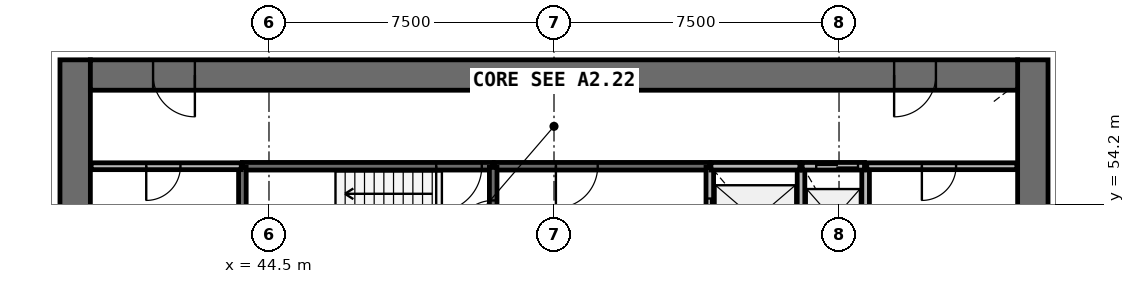
"""IFC4 building model, lengths in metres.
Left out: names, types, materials, properties, quantities, classifications, styles, units other than length and angle.
Written with IfcOpenShell. Run it as: python <this file> out.ifc"""

import sys

from ifc_helpers import new_model, si_unit, direction, frame, frame_2d, origin, place, context, subcontext, project, spatial, rectangle, extrude, source, transform, mapped, element, fill, save


model = new_model("IFC4")
c1 = context("Model", 3, precision=1e-05, world=origin(), true_north=direction((0.0, 1.0)))
c2 = subcontext(c1, "Body", "Model", "MODEL_VIEW")
j1 = project(units=[si_unit("LENGTHUNIT", "METRE"), si_unit("PLANEANGLEUNIT", "RADIAN")], contexts=[c1])
p1 = place(None, origin())
s1 = spatial("IfcSite", under=j1, at=p1, CompositionType="ELEMENT")
p2 = place(p1, origin())
s2 = spatial("IfcBuilding", under=s1, at=p2, CompositionType="ELEMENT")
p3 = place(p2, frame((0.0, 0.0, 92.1)))
s3 = spatial("IfcBuildingStorey", under=s2, at=p3, CompositionType="ELEMENT", Elevation=92.1)
p4 = place(p3, frame((64.6, 38.0, 0.0), z_axis=(0.0, 0.0, 1.0), x_axis=(0.0, 1.0, 0.0)))
e1 = element("IfcWall", 1, at=p4, inside=s3, PredefinedType="SHEAR", context=c2, shape_type="SweptSolid", body=[
    extrude(rectangle(XDim=20.0, YDim=0.8, at=frame_2d((10.0, 0.0))), origin(), (0.0, 0.0, 1.0), 4.1),
])
p5 = place(p4, frame((9.1, 0.0, 0.0)))
e2 = element("IfcOpeningElement", 2, at=p5, cuts=e1, PredefinedType="OPENING", context=c2, shape_type="SweptSolid", body=[
    extrude(rectangle(XDim=1.8, YDim=2.1, at=frame_2d((0.9, 1.05))), frame((0.0, 0.41, 0.0), z_axis=(0.0, -1.0, 0.0), x_axis=(1.0, 0.0, 0.0)), (0.0, 0.0, 1.0), 0.82),
])
p6 = place(p3, frame((39.4, 58.0, 0.0), z_axis=(0.0, 0.0, 1.0), x_axis=(0.0, -1.0, 0.0)))
e3 = element("IfcWall", 3, at=p6, inside=s3, PredefinedType="SHEAR", context=c2, shape_type="SweptSolid", body=[
    extrude(rectangle(XDim=20.0, YDim=0.8, at=frame_2d((10.0, 0.0))), origin(), (0.0, 0.0, 1.0), 4.1),
])
p7 = place(p6, frame((9.1, 0.0, 0.0)))
e4 = element("IfcOpeningElement", 4, at=p7, cuts=e3, PredefinedType="OPENING", context=c2, shape_type="SweptSolid", body=[
    extrude(rectangle(XDim=1.8, YDim=2.1, at=frame_2d((0.9, 1.05))), frame((0.0, 0.41, 0.0), z_axis=(0.0, -1.0, 0.0), x_axis=(1.0, 0.0, 0.0)), (0.0, 0.0, 1.0), 0.82),
])
p8 = place(p3, frame((64.2, 57.6, 0.0), z_axis=(0.0, 0.0, 1.0), x_axis=(-1.0, 0.0, 0.0)))
e5 = element("IfcWall", 5, at=p8, inside=s3, PredefinedType="SHEAR", context=c2, shape_type="SweptSolid", body=[
    extrude(rectangle(XDim=24.4, YDim=0.8, at=frame_2d((12.2, 0.0))), origin(), (0.0, 0.0, 1.0), 4.1),
])
p9 = place(p8, frame((21.65, 0.0, 0.0)))
e6 = element("IfcOpeningElement", 6, at=p9, cuts=e5, PredefinedType="OPENING", context=c2, shape_type="SweptSolid", body=[
    extrude(rectangle(XDim=1.1, YDim=2.1, at=frame_2d((0.55, 1.05))), frame((0.0, 0.41, 0.0), z_axis=(0.0, -1.0, 0.0), x_axis=(1.0, 0.0, 0.0)), (0.0, 0.0, 1.0), 0.82),
])
p10 = place(p8, frame((2.15, 0.0, 0.0)))
e7 = element("IfcOpeningElement", 7, at=p10, cuts=e5, PredefinedType="OPENING", context=c2, shape_type="SweptSolid", body=[
    extrude(rectangle(XDim=1.1, YDim=2.1, at=frame_2d((0.55, 1.05))), frame((0.0, 0.41, 0.0), z_axis=(0.0, -1.0, 0.0), x_axis=(1.0, 0.0, 0.0)), (0.0, 0.0, 1.0), 0.82),
])
p11 = place(p3, frame((50.4, 55.2, 0.0), z_axis=(0.0, 0.0, 1.0), x_axis=(-1.0, 0.0, 0.0)))
e8 = element("IfcWall", 8, at=p11, inside=s3, PredefinedType="SOLIDWALL", context=c2, shape_type="SweptSolid", body=[
    extrude(rectangle(XDim=6.6, YDim=0.2, at=frame_2d((3.3, 0.0))), origin(), (0.0, 0.0, 1.0), 3.7),
])
p12 = place(p11, frame((0.3, 0.0, 0.0)))
e9 = element("IfcOpeningElement", 9, at=p12, cuts=e8, PredefinedType="OPENING", context=c2, shape_type="SweptSolid", body=[
    extrude(rectangle(XDim=1.2, YDim=2.1, at=frame_2d((0.6, 1.05))), frame((0.0, 0.11, 0.0), z_axis=(0.0, -1.0, 0.0), x_axis=(1.0, 0.0, 0.0)), (0.0, 0.0, 1.0), 0.22),
])
p13 = place(p3, frame((56.1, 55.2, 0.0), z_axis=(0.0, 0.0, 1.0), x_axis=(-1.0, 0.0, 0.0)))
e10 = element("IfcWall", 10, at=p13, inside=s3, PredefinedType="SOLIDWALL", context=c2, shape_type="SweptSolid", body=[
    extrude(rectangle(XDim=5.67, YDim=0.2, at=frame_2d((2.835, 0.0))), origin(), (0.0, 0.0, 1.0), 3.7),
])
p14 = place(p13, frame((2.95, 0.0, 0.0)))
e11 = element("IfcOpeningElement", 11, at=p14, cuts=e10, PredefinedType="OPENING", context=c2, shape_type="SweptSolid", body=[
    extrude(rectangle(XDim=1.1, YDim=2.1, at=frame_2d((0.55, 1.05))), frame((0.0, 0.11, 0.0), z_axis=(0.0, -1.0, 0.0), x_axis=(1.0, 0.0, 0.0)), (0.0, 0.0, 1.0), 0.22),
])
p15 = place(p3, frame((50.4, 52.4, 0.0), z_axis=(0.0, 0.0, 1.0), x_axis=(0.0, 1.0, 0.0)))
e12 = element("IfcWall", 12, at=p15, inside=s3, PredefinedType="SOLIDWALL", context=c2, shape_type="SweptSolid", body=[
    extrude(rectangle(XDim=2.77, YDim=0.2, at=frame_2d((1.385, 0.0))), origin(), (0.0, 0.0, 1.0), 3.7),
])
p16 = place(p15, frame((0.9, 0.0, 0.0)))
e13 = element("IfcOpeningElement", 13, at=p16, cuts=e12, PredefinedType="OPENING", context=c2, shape_type="SweptSolid", body=[
    extrude(rectangle(XDim=1.0, YDim=2.1, at=frame_2d((0.5, 1.05))), frame((0.0, 0.11, 0.0), z_axis=(0.0, -1.0, 0.0), x_axis=(1.0, 0.0, 0.0)), (0.0, 0.0, 1.0), 0.22),
])
p17 = place(p3, frame((56.1, 55.17, 0.0), z_axis=(0.0, 0.0, 1.0), x_axis=(0.0, -1.0, 0.0)))
e14 = element("IfcWall", 14, at=p17, inside=s3, PredefinedType="SOLIDWALL", context=c2, shape_type="SweptSolid", body=[
    extrude(rectangle(XDim=2.77, YDim=0.2, at=frame_2d((1.385, 0.0))), origin(), (0.0, 0.0, 1.0), 3.7),
])
p18 = place(p17, frame((0.82, 0.0, 0.0)))
e15 = element("IfcOpeningElement", 15, at=p18, cuts=e14, PredefinedType="OPENING", context=c2, shape_type="SweptSolid", body=[
    extrude(rectangle(XDim=1.1, YDim=2.1, at=frame_2d((0.55, 1.05))), frame((0.0, 0.11, 0.0), z_axis=(0.0, -1.0, 0.0), x_axis=(1.0, 0.0, 0.0)), (0.0, 0.0, 1.0), 0.22),
])
for number, where, z_axis, x_axis in (
    (16, (58.5, 52.4, 0.0), (0.0, 0.0, 1.0), (0.0, 1.0, 0.0)),
    (17, (60.2, 52.4, 0.0), (0.0, 0.0, 1.0), (0.0, 1.0, 0.0)),
):
    element("IfcWall", number, at=place(p3, frame(where, z_axis=z_axis, x_axis=x_axis)), inside=s3, PredefinedType="SOLIDWALL", context=c2, shape_type="SweptSolid", body=[
        extrude(rectangle(XDim=2.8, YDim=0.2, at=frame_2d((1.4, 0.0))), origin(), (0.0, 0.0, 1.0), 3.7),
    ])
p19 = place(p3, frame((58.47, 55.2, 0.0), z_axis=(0.0, 0.0, 1.0), x_axis=(-1.0, 0.0, 0.0)))
e18 = element("IfcWall", 18, at=p19, inside=s3, PredefinedType="SOLIDWALL", context=c2, shape_type="SweptSolid", body=[
    extrude(rectangle(XDim=2.34, YDim=0.2, at=frame_2d((1.17, 0.0))), origin(), (0.0, 0.0, 1.0), 3.7),
])
p20 = place(p3, frame((43.8, 55.17, 0.0), z_axis=(0.0, 0.0, 1.0), x_axis=(0.0, -1.0, 0.0)))
e19 = element("IfcWall", 19, at=p20, inside=s3, PredefinedType="SOLIDWALL", context=c2, shape_type="SweptSolid", body=[
    extrude(rectangle(XDim=2.14, YDim=0.2, at=frame_2d((1.07, 0.0))), origin(), (0.0, 0.0, 1.0), 3.7),
])
p21 = place(p3, frame((60.17, 55.2, 0.0), z_axis=(0.0, 0.0, 1.0), x_axis=(-1.0, 0.0, 0.0)))
e20 = element("IfcWall", 20, at=p21, inside=s3, PredefinedType="SOLIDWALL", context=c2, shape_type="SweptSolid", body=[
    extrude(rectangle(XDim=1.64, YDim=0.2, at=frame_2d((0.82, 0.0))), origin(), (0.0, 0.0, 1.0), 3.7),
])
p22 = place(p21, frame((0.17, 0.0, 0.0)))
e21 = element("IfcOpeningElement", 21, at=p22, cuts=e20, PredefinedType="OPENING", context=c2, shape_type="SweptSolid", body=[
    extrude(rectangle(XDim=1.1, YDim=2.1, at=frame_2d((0.55, 1.05))), frame((0.0, 0.11, 0.0), z_axis=(0.0, -1.0, 0.0), x_axis=(1.0, 0.0, 0.0)), (0.0, 0.0, 1.0), 0.22),
])
p23 = place(p3, frame((64.18, 55.2, 0.0), z_axis=(0.0, 0.0, 1.0), x_axis=(-1.0, 0.0, 0.0)))
e22 = element("IfcWall", 22, at=p23, inside=s3, PredefinedType="PARTITIONING", context=c2, shape_type="SweptSolid", body=[
    extrude(rectangle(XDim=3.95, YDim=0.18, at=frame_2d((1.975, 0.0))), origin(), (0.0, 0.0, 1.0), 3.7),
])
p24 = place(p23, frame((1.6, 0.0, 0.0)))
e23 = element("IfcOpeningElement", 23, at=p24, cuts=e22, PredefinedType="OPENING", context=c2, shape_type="SweptSolid", body=[
    extrude(rectangle(XDim=0.9, YDim=2.1, at=frame_2d((0.45, 1.05))), frame((0.0, 0.1, 0.0), z_axis=(0.0, -1.0, 0.0), x_axis=(1.0, 0.0, 0.0)), (0.0, 0.0, 1.0), 0.2),
])
p25 = place(p3, frame((43.77, 55.2, 0.0), z_axis=(0.0, 0.0, 1.0), x_axis=(-1.0, 0.0, 0.0)))
e24 = element("IfcWall", 24, at=p25, inside=s3, PredefinedType="PARTITIONING", context=c2, shape_type="SweptSolid", body=[
    extrude(rectangle(XDim=3.95, YDim=0.18, at=frame_2d((1.975, 0.0))), origin(), (0.0, 0.0, 1.0), 3.7),
])
p26 = place(p25, frame((1.6, 0.0, 0.0)))
e25 = element("IfcOpeningElement", 25, at=p26, cuts=e24, PredefinedType="OPENING", context=c2, shape_type="SweptSolid", body=[
    extrude(rectangle(XDim=0.9, YDim=2.1, at=frame_2d((0.45, 1.05))), frame((0.0, 0.1, 0.0), z_axis=(0.0, -1.0, 0.0), x_axis=(1.0, 0.0, 0.0)), (0.0, 0.0, 1.0), 0.2),
])
m1 = source(origin(), c2, "Body", "SweptSolid", [
    extrude(rectangle(XDim=1.1, YDim=2.1, at=frame_2d((0.55, 1.05))), frame((0.0, 0.025, 0.0), z_axis=(0.0, -1.0, 0.0), x_axis=(1.0, 0.0, 0.0)), (0.0, 0.0, 1.0), 0.05),
])
p27 = place(p18, origin())
e26 = element("IfcDoor", 26, at=p27, inside=s3, OperationType="DOUBLE_DOOR_SLIDING", PredefinedType="USERDEFINED", context=c2, shape_type="MappedRepresentation", body=[
    mapped(m1, transform((0.0, 0.0, 0.0), scale=1.0)),
])
fill(e15, e26)
p28 = place(p22, origin())
e27 = element("IfcDoor", 27, at=p28, inside=s3, OperationType="DOUBLE_DOOR_SLIDING", PredefinedType="USERDEFINED", context=c2, shape_type="MappedRepresentation", body=[
    mapped(m1, transform((0.0, 0.0, 0.0), scale=1.0)),
])
fill(e21, e27)
m2 = source(origin(), c2, "Body", "SweptSolid", [
    extrude(rectangle(XDim=1.2, YDim=2.1, at=frame_2d((0.6, 1.05))), frame((0.0, 0.025, 0.0), z_axis=(0.0, -1.0, 0.0), x_axis=(1.0, 0.0, 0.0)), (0.0, 0.0, 1.0), 0.05),
])
p29 = place(p12, origin())
e28 = element("IfcDoor", 28, at=p29, inside=s3, OperationType="SINGLE_SWING_RIGHT", PredefinedType="DOOR", context=c2, shape_type="MappedRepresentation", body=[
    mapped(m2, transform((0.0, 0.0, 0.0), scale=1.0)),
])
fill(e9, e28)
m3 = source(origin(), c2, "Body", "SweptSolid", [
    extrude(rectangle(XDim=1.0, YDim=2.1, at=frame_2d((0.5, 1.05))), frame((0.0, 0.025, 0.0), z_axis=(0.0, -1.0, 0.0), x_axis=(1.0, 0.0, 0.0)), (0.0, 0.0, 1.0), 0.05),
])
p30 = place(p16, origin())
e29 = element("IfcDoor", 29, at=p30, inside=s3, OperationType="SINGLE_SWING_LEFT", PredefinedType="DOOR", context=c2, shape_type="MappedRepresentation", body=[
    mapped(m3, transform((0.0, 0.0, 0.0), scale=1.0)),
])
fill(e13, e29)
m4 = source(origin(), c2, "Body", "SweptSolid", [
    extrude(rectangle(XDim=1.1, YDim=2.1, at=frame_2d((0.55, 1.05))), frame((0.0, 0.025, 0.0), z_axis=(0.0, -1.0, 0.0), x_axis=(1.0, 0.0, 0.0)), (0.0, 0.0, 1.0), 0.05),
])
p31 = place(p14, origin())
e30 = element("IfcDoor", 30, at=p31, inside=s3, OperationType="SINGLE_SWING_RIGHT", PredefinedType="DOOR", context=c2, shape_type="MappedRepresentation", body=[
    mapped(m4, transform((0.0, 0.0, 0.0), scale=1.0)),
])
fill(e11, e30)
m5 = source(origin(), c2, "Body", "SweptSolid", [
    extrude(rectangle(XDim=1.1, YDim=2.1, at=frame_2d((0.55, 1.05))), frame((0.0, 0.025, 0.0), z_axis=(0.0, -1.0, 0.0), x_axis=(1.0, 0.0, 0.0)), (0.0, 0.0, 1.0), 0.05),
])
p32 = place(p9, origin())
e31 = element("IfcDoor", 31, at=p32, inside=s3, OperationType="SINGLE_SWING_LEFT", PredefinedType="DOOR", context=c2, shape_type="MappedRepresentation", body=[
    mapped(m5, transform((0.0, 0.0, 0.0), scale=1.0)),
])
fill(e6, e31)
p33 = place(p10, origin())
e32 = element("IfcDoor", 32, at=p33, inside=s3, OperationType="SINGLE_SWING_RIGHT", PredefinedType="DOOR", context=c2, shape_type="MappedRepresentation", body=[
    mapped(m5, transform((0.0, 0.0, 0.0), scale=1.0)),
])
fill(e7, e32)
m6 = source(origin(), c2, "Body", "SweptSolid", [
    extrude(rectangle(XDim=0.9, YDim=2.1, at=frame_2d((0.45, 1.05))), frame((0.0, 0.025, 0.0), z_axis=(0.0, -1.0, 0.0), x_axis=(1.0, 0.0, 0.0)), (0.0, 0.0, 1.0), 0.05),
])
p34 = place(p26, origin())
e33 = element("IfcDoor", 33, at=p34, inside=s3, OperationType="SINGLE_SWING_RIGHT", PredefinedType="DOOR", context=c2, shape_type="MappedRepresentation", body=[
    mapped(m6, transform((0.0, 0.0, 0.0), scale=1.0)),
])
fill(e25, e33)
p35 = place(p24, origin())
e34 = element("IfcDoor", 34, at=p35, inside=s3, OperationType="SINGLE_SWING_RIGHT", PredefinedType="DOOR", context=c2, shape_type="MappedRepresentation", body=[
    mapped(m6, transform((0.0, 0.0, 0.0), scale=1.0)),
])
fill(e23, e34)
save(model, sys.argv[1])
